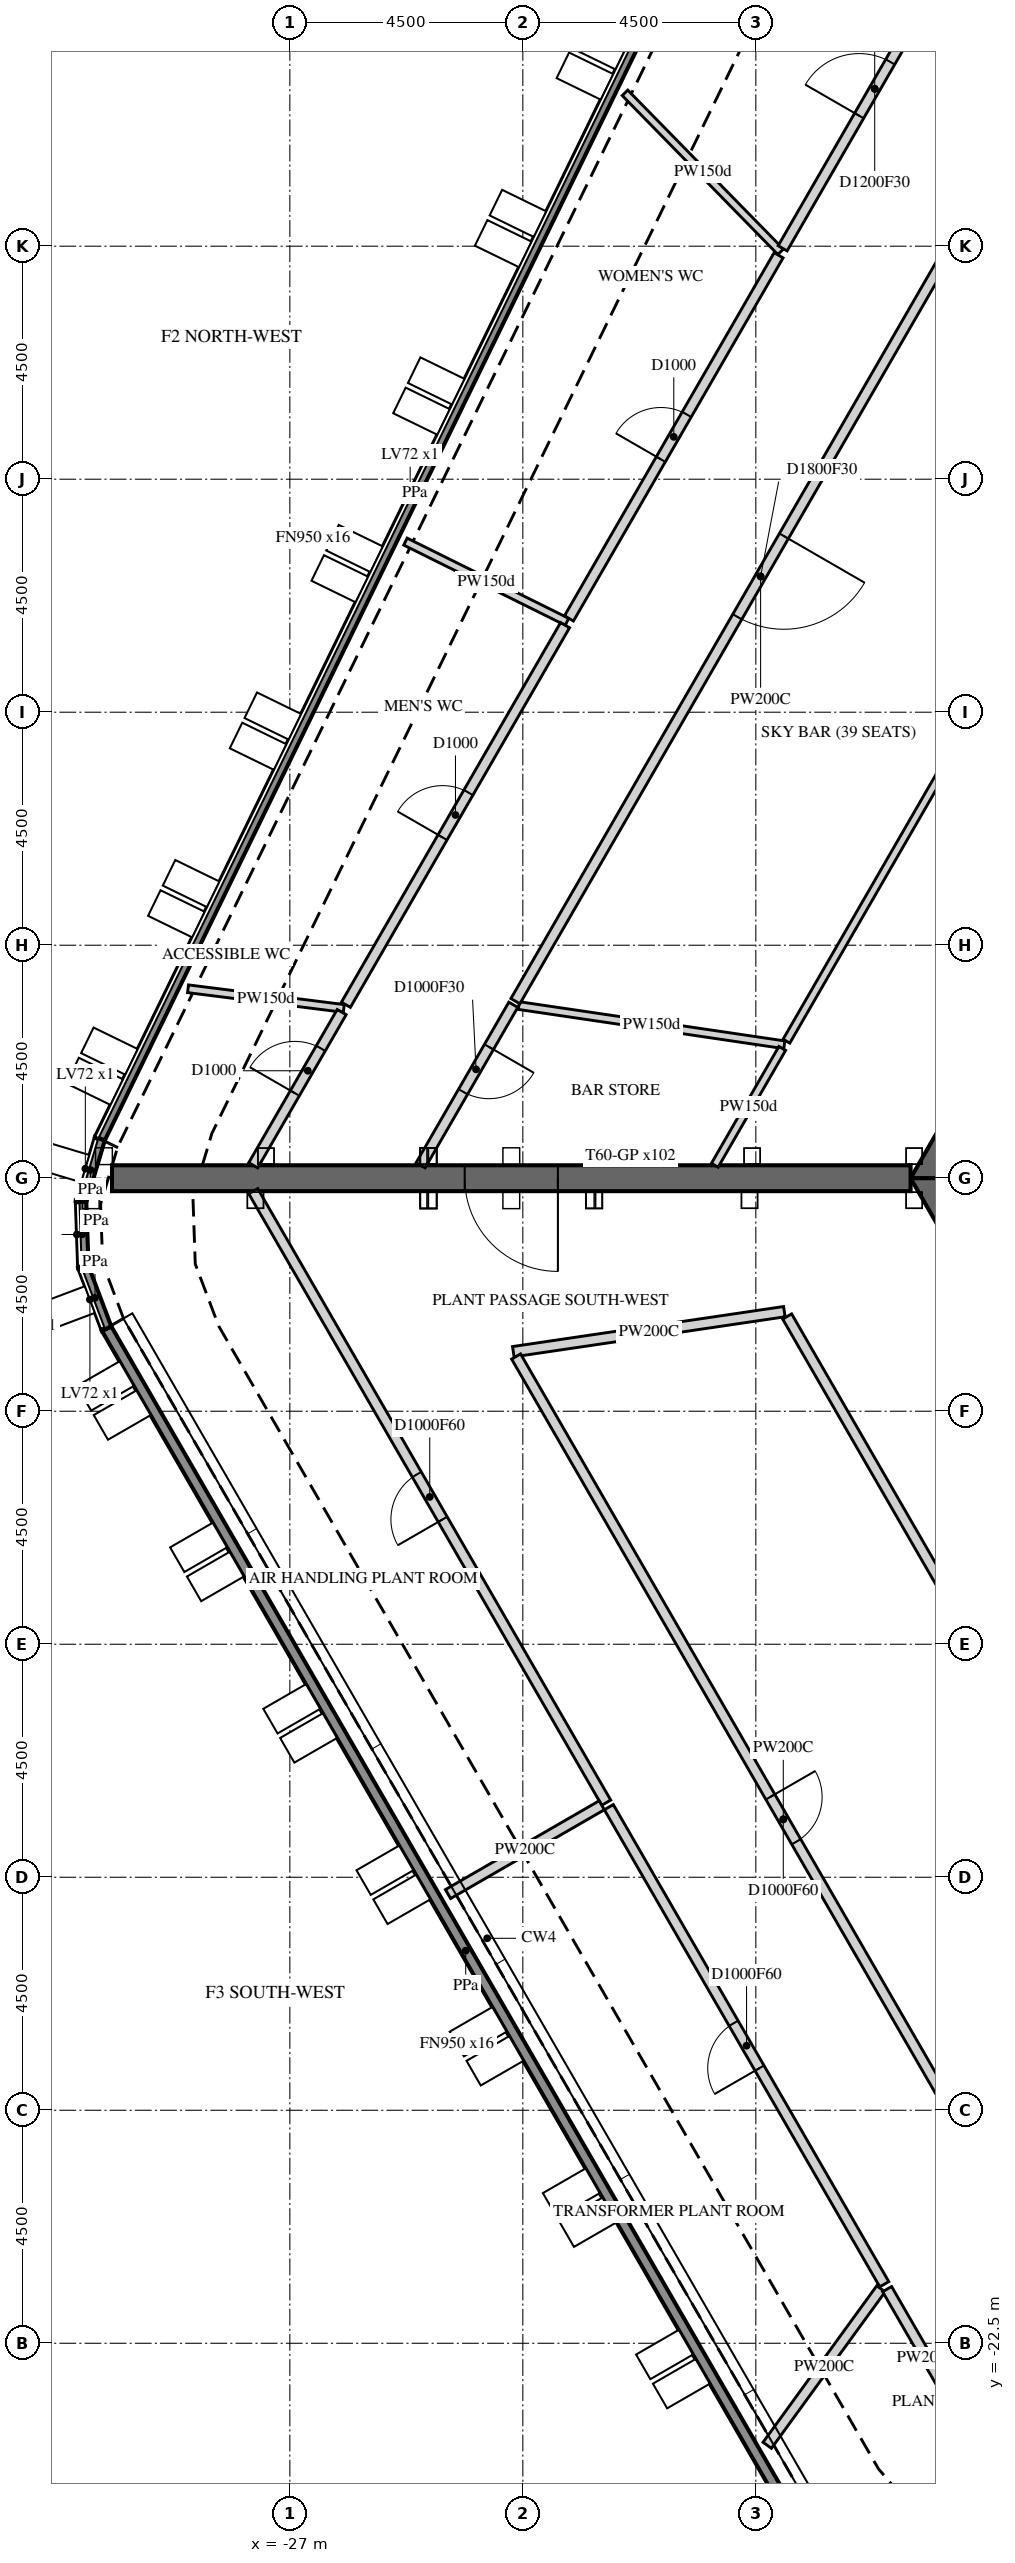
"""IFC4 building model, lengths in metres.
Left out: names, types, materials, properties, quantities, classifications, styles, units other than length and angle.
Written with IfcOpenShell. Run it as: python <this file> out.ifc"""

import sys

from ifc_helpers import new_model, si_unit, direction, frame, frame_2d, origin, place, context, subcontext, project, spatial, polyline, rectangle, outline, extrude, element, fill, save


model = new_model("IFC4")
c1 = context("Model", 3, precision=1e-05, world=origin(), true_north=direction((0.0, 1.0)))
c2 = subcontext(c1, "Body", "Model", "MODEL_VIEW")
j1 = project(units=[si_unit("LENGTHUNIT", "METRE"), si_unit("PLANEANGLEUNIT", "RADIAN")], contexts=[c1])
p1 = place(None, origin())
s1 = spatial("IfcSite", under=j1, at=p1, CompositionType="ELEMENT")
p2 = place(p1, origin())
s2 = spatial("IfcBuilding", under=s1, at=p2, CompositionType="ELEMENT")
p3 = place(p2, frame((0.0, 0.0, 250.2)))
s3 = spatial("IfcBuildingStorey", under=s2, at=p3, CompositionType="ELEMENT", Elevation=250.2)
p4 = place(p3, frame((-16.668, -26.93, 5.7), z_axis=(0.0, 0.0, 1.0), x_axis=(-0.499997219864, 0.866027008891, 0.0)))
e1 = element("IfcWall", 1, at=p4, inside=s3, PredefinedType="PARAPET", context=c2, shape_type="SweptSolid", body=[
    extrude(outline(polyline([(0.009, -0.1), (27.732, -0.1), (27.749, 0.1), (-0.009, 0.1), (0.009, -0.1)])), origin(), (0.0, 0.0, 1.0), 1.1),
])
p5 = place(p3, frame((-30.539, -2.906, 5.7), z_axis=(0.0, 0.0, 1.0), x_axis=(-0.352930531417, 0.935649528399, 0.0)))
e2 = element("IfcWall", 2, at=p5, inside=s3, PredefinedType="PARAPET", context=c2, shape_type="SweptSolid", body=[
    extrude(outline(polyline([(0.008, -0.1), (1.256, -0.1), (1.289, 0.1), (-0.008, 0.1), (0.008, -0.1)])), origin(), (0.0, 0.0, 1.0), 1.1),
])
p6 = place(p3, frame((-30.988, -1.715, 5.7), z_axis=(0.0, 0.0, 1.0), x_axis=(-0.034940984606, 0.999389377367, 0.0)))
e3 = element("IfcWall", 3, at=p6, inside=s3, PredefinedType="PARAPET", context=c2, shape_type="SweptSolid", body=[
    extrude(outline(polyline([(0.016, -0.1), (1.248, -0.1), (1.281, 0.1), (-0.016, 0.1), (0.016, -0.1)])), origin(), (0.0, 0.0, 1.0), 1.1),
])
p7 = place(p3, frame((-31.032, -0.451, 5.7), z_axis=(0.0, 0.0, 1.0), x_axis=(0.286960705178, 0.95794235405, 0.0)))
e4 = element("IfcWall", 4, at=p7, inside=s3, PredefinedType="PARAPET", context=c2, shape_type="SweptSolid", body=[
    extrude(outline(polyline([(0.016, -0.1), (1.265, -0.1), (1.281, 0.1), (-0.016, 0.1), (0.016, -0.1)])), origin(), (0.0, 0.0, 1.0), 1.1),
])
p8 = place(p3, frame((-30.667, 0.768, 5.7), z_axis=(0.0, 0.0, 1.0), x_axis=(0.43836623679, 0.898796441049, 0.0)))
e5 = element("IfcWall", 5, at=p8, inside=s3, PredefinedType="PARAPET", context=c2, shape_type="SweptSolid", body=[
    extrude(outline(polyline([(0.008, -0.1), (27.731, -0.1), (27.75, 0.1), (-0.008, 0.1), (0.008, -0.1)])), origin(), (0.0, 0.0, 1.0), 1.1),
])
p9 = place(p3, frame((-7.361, 12.75, -0.3), z_axis=(0.0, 0.0, 1.0), x_axis=(-0.50000571537, -0.866022103989, 0.0)))
e6 = element("IfcWall", 6, at=p9, inside=s3, PredefinedType="SHEAR", context=c2, shape_type="SweptSolid", body=[
    extrude(outline(polyline([(-0.144, -0.25), (14.867, -0.25), (14.578, 0.25), (0.144, 0.25), (-0.144, -0.25)])), origin(), (0.0, 0.0, 1.0), 5.8),
])
p10 = place(p9, frame((6.49, 0.0, 0.3)))
e7 = element("IfcOpeningElement", 7, at=p10, cuts=e6, PredefinedType="OPENING", context=c2, shape_type="SweptSolid", body=[
    extrude(rectangle(XDim=1.8, YDim=2.4, at=frame_2d((0.9, 1.2))), frame((0.0, 0.26, 0.0), z_axis=(0.0, -1.0, 0.0), x_axis=(1.0, 0.0, 0.0)), (0.0, 0.0, 1.0), 0.52),
])
p11 = place(p3, frame((-14.722, 0.0, -0.3), z_axis=(0.0, 0.0, 1.0), x_axis=(0.50000571537, -0.866022103989, 0.0)))
e8 = element("IfcWall", 8, at=p11, inside=s3, PredefinedType="SHEAR", context=c2, shape_type="SweptSolid", body=[
    extrude(outline(polyline([(-0.144, -0.25), (14.867, -0.25), (14.578, 0.25), (0.144, 0.25), (-0.144, -0.25)])), origin(), (0.0, 0.0, 1.0), 5.8),
])
p12 = place(p11, frame((6.432, 0.0, 0.3)))
e9 = element("IfcOpeningElement", 9, at=p12, cuts=e8, PredefinedType="OPENING", context=c2, shape_type="SweptSolid", body=[
    extrude(rectangle(XDim=1.8, YDim=2.4, at=frame_2d((0.9, 1.2))), frame((0.0, 0.26, 0.0), z_axis=(0.0, -1.0, 0.0), x_axis=(1.0, 0.0, 0.0)), (0.0, 0.0, 1.0), 0.52),
])
p13 = place(p3, frame((-15.011, 0.0, -0.3), z_axis=(0.0, 0.0, 1.0), x_axis=(-1.0, 0.0, 0.0)))
e10 = element("IfcWall", 10, at=p13, inside=s3, PredefinedType="SHEAR", context=c2, shape_type="SweptSolid", body=[
    extrude(rectangle(XDim=15.424, YDim=0.5, at=frame_2d((7.712, 0.0))), origin(), (0.0, 0.0, 1.0), 5.8),
])
p14 = place(p13, frame((6.812, 0.0, 0.3)))
e11 = element("IfcOpeningElement", 11, at=p14, cuts=e10, PredefinedType="OPENING", context=c2, shape_type="SweptSolid", body=[
    extrude(rectangle(XDim=1.8, YDim=2.4, at=frame_2d((0.9, 1.2))), frame((0.0, 0.26, 0.0), z_axis=(0.0, -1.0, 0.0), x_axis=(1.0, 0.0, 0.0)), (0.0, 0.0, 1.0), 0.52),
])
p15 = place(p3, frame((-28.966, 3.659, 0.0), z_axis=(0.0, 0.0, 1.0), x_axis=(0.992111002578, -0.125362508604, 0.0)))
e12 = element("IfcWall", 12, at=p15, inside=s3, PredefinedType="PARTITIONING", context=c2, shape_type="SweptSolid", body=[
    extrude(rectangle(XDim=3.032, YDim=0.15, at=frame_2d((1.516, 0.0))), origin(), (0.0, 0.0, 1.0), 5.5),
])
p16 = place(p3, frame((-20.889, -12.06, 0.0), z_axis=(0.0, 0.0, 1.0), x_axis=(-0.49997661062, 0.866038907228, 0.0)))
e13 = element("IfcWall", 13, at=p16, inside=s3, PredefinedType="PARTITIONING", context=c2, shape_type="SweptSolid", body=[
    extrude(rectangle(XDim=13.637, YDim=0.2, at=frame_2d((6.818, 0.0))), origin(), (0.0, 0.0, 1.0), 5.5),
])
p17 = place(p16, frame((6.318, 0.0, 0.0)))
e14 = element("IfcOpeningElement", 14, at=p17, cuts=e13, PredefinedType="OPENING", context=c2, shape_type="SweptSolid", body=[
    extrude(rectangle(XDim=1.0, YDim=2.1, at=frame_2d((0.5, 1.05))), frame((0.0, 0.11, 0.0), z_axis=(0.0, -1.0, 0.0), x_axis=(1.0, 0.0, 0.0)), (0.0, 0.0, 1.0), 0.22),
])
p18 = place(p3, frame((-27.707, 0.25, 0.0), z_axis=(0.0, 0.0, 1.0), x_axis=(0.50003588027, 0.86600468731, 0.0)))
e15 = element("IfcWall", 15, at=p18, inside=s3, PredefinedType="PARTITIONING", context=c2, shape_type="SweptSolid", body=[
    extrude(rectangle(XDim=3.416, YDim=0.2, at=frame_2d((1.708, 0.0))), origin(), (0.0, 0.0, 1.0), 5.5),
])
p19 = place(p18, frame((1.608, 0.0, 0.0)))
e16 = element("IfcOpeningElement", 16, at=p19, cuts=e15, PredefinedType="OPENING", context=c2, shape_type="SweptSolid", body=[
    extrude(rectangle(XDim=1.0, YDim=2.1, at=frame_2d((0.5, 1.05))), frame((0.0, 0.11, 0.0), z_axis=(0.0, -1.0, 0.0), x_axis=(1.0, 0.0, 0.0)), (0.0, 0.0, 1.0), 0.22),
])
p20 = place(p3, frame((-24.767, 12.295, 0.0), z_axis=(0.0, 0.0, 1.0), x_axis=(0.895713074793, -0.444632531024, 0.0)))
e17 = element("IfcWall", 17, at=p20, inside=s3, PredefinedType="PARTITIONING", context=c2, shape_type="SweptSolid", body=[
    extrude(rectangle(XDim=3.483, YDim=0.15, at=frame_2d((1.742, 0.0))), origin(), (0.0, 0.0, 1.0), 5.5),
])
p21 = place(p3, frame((-22.684, 3.35, 0.0), z_axis=(0.0, 0.0, 1.0), x_axis=(-0.500041240653, -0.866001592173, 0.0)))
e18 = element("IfcWall", 18, at=p21, inside=s3, PredefinedType="PARTITIONING", context=c2, shape_type="SweptSolid", body=[
    extrude(rectangle(XDim=3.58, YDim=0.2, at=frame_2d((1.79, 0.0))), origin(), (0.0, 0.0, 1.0), 5.5),
])
p22 = place(p21, frame((0.94, 0.0, 0.0)))
e19 = element("IfcOpeningElement", 19, at=p22, cuts=e18, PredefinedType="OPENING", context=c2, shape_type="SweptSolid", body=[
    extrude(rectangle(XDim=1.0, YDim=2.1, at=frame_2d((0.5, 1.05))), frame((0.0, 0.11, 0.0), z_axis=(0.0, -1.0, 0.0), x_axis=(1.0, 0.0, 0.0)), (0.0, 0.0, 1.0), 0.22),
])
p23 = place(p3, frame((-23.945, -13.825, 0.0), z_axis=(0.0, 0.0, 1.0), x_axis=(0.865991142412, 0.500059337743, 0.0)))
e20 = element("IfcWall", 20, at=p23, inside=s3, PredefinedType="PARTITIONING", context=c2, shape_type="SweptSolid", body=[
    extrude(rectangle(XDim=3.429, YDim=0.2, at=frame_2d((1.715, 0.0))), origin(), (0.0, 0.0, 1.0), 5.5),
])
p24 = place(p3, frame((-22.684, -3.35, 0.0), z_axis=(0.0, 0.0, 1.0), x_axis=(0.989268510668, 0.146108910753, 0.0)))
e21 = element("IfcWall", 21, at=p24, inside=s3, PredefinedType="PARTITIONING", context=c2, shape_type="SweptSolid", body=[
    extrude(rectangle(XDim=5.292, YDim=0.2, at=frame_2d((2.646, 0.0))), origin(), (0.0, 0.0, 1.0), 5.5),
])
p25 = place(p3, frame((-22.578, 3.334, 0.0), z_axis=(0.0, 0.0, 1.0), x_axis=(0.989272631556, -0.146081006478, 0.0)))
e22 = element("IfcWall", 22, at=p25, inside=s3, PredefinedType="PARTITIONING", context=c2, shape_type="SweptSolid", body=[
    extrude(rectangle(XDim=5.184, YDim=0.15, at=frame_2d((2.592, 0.0))), origin(), (0.0, 0.0, 1.0), 5.5),
])
p26 = place(p3, frame((-13.172, 19.825, 0.0), z_axis=(0.0, 0.0, 1.0), x_axis=(-0.499999503755, -0.866025690291, 0.0)))
e23 = element("IfcWall", 23, at=p26, inside=s3, PredefinedType="PARTITIONING", context=c2, shape_type="SweptSolid", body=[
    extrude(rectangle(XDim=18.943, YDim=0.2, at=frame_2d((9.471, 0.0))), origin(), (0.0, 0.0, 1.0), 5.5),
])
p27 = place(p26, frame((8.572, 0.0, 0.0)))
e24 = element("IfcOpeningElement", 24, at=p27, cuts=e23, PredefinedType="OPENING", context=c2, shape_type="SweptSolid", body=[
    extrude(rectangle(XDim=1.8, YDim=2.1, at=frame_2d((0.9, 1.05))), frame((0.0, 0.11, 0.0), z_axis=(0.0, -1.0, 0.0), x_axis=(1.0, 0.0, 0.0)), (0.0, 0.0, 1.0), 0.22),
])
p28 = place(p3, frame((-25.917, 3.349, 0.0), z_axis=(0.0, 0.0, 1.0), x_axis=(0.499982078236, 0.866035750673, 0.0)))
e25 = element("IfcWall", 25, at=p28, inside=s3, PredefinedType="PARTITIONING", context=c2, shape_type="SweptSolid", body=[
    extrude(rectangle(XDim=8.466, YDim=0.2, at=frame_2d((4.233, 0.0))), origin(), (0.0, 0.0, 1.0), 5.5),
])
p29 = place(p28, frame((3.733, 0.0, 0.0)))
e26 = element("IfcOpeningElement", 26, at=p29, cuts=e25, PredefinedType="OPENING", context=c2, shape_type="SweptSolid", body=[
    extrude(rectangle(XDim=1.0, YDim=2.1, at=frame_2d((0.5, 1.05))), frame((0.0, 0.11, 0.0), z_axis=(0.0, -1.0, 0.0), x_axis=(1.0, 0.0, 0.0)), (0.0, 0.0, 1.0), 0.22),
])
p30 = place(p3, frame((-15.519, -21.36, 0.0), z_axis=(0.0, 0.0, 1.0), x_axis=(-0.500040928938, 0.866001772162, 0.0)))
e27 = element("IfcWall", 27, at=p30, inside=s3, PredefinedType="PARTITIONING", context=c2, shape_type="SweptSolid", body=[
    extrude(rectangle(XDim=10.639, YDim=0.2, at=frame_2d((5.32, 0.0))), origin(), (0.0, 0.0, 1.0), 5.5),
])
p31 = place(p30, frame((4.82, 0.0, 0.0)))
e28 = element("IfcOpeningElement", 28, at=p31, cuts=e27, PredefinedType="OPENING", context=c2, shape_type="SweptSolid", body=[
    extrude(rectangle(XDim=1.0, YDim=2.1, at=frame_2d((0.5, 1.05))), frame((0.0, 0.11, 0.0), z_axis=(0.0, -1.0, 0.0), x_axis=(1.0, 0.0, 0.0)), (0.0, 0.0, 1.0), 0.22),
])
p32 = place(p3, frame((-20.527, 20.962, 0.0), z_axis=(0.0, 0.0, 1.0), x_axis=(0.699623583843, -0.714511610074, 0.0)))
e29 = element("IfcWall", 29, at=p32, inside=s3, PredefinedType="PARTITIONING", context=c2, shape_type="SweptSolid", body=[
    extrude(rectangle(XDim=4.296, YDim=0.15, at=frame_2d((2.148, 0.0))), origin(), (0.0, 0.0, 1.0), 5.5),
])
p33 = place(p3, frame((-17.78, -24.471, 0.0), z_axis=(0.0, 0.0, 1.0), x_axis=(0.587876353265, 0.808950797807, 0.0)))
e30 = element("IfcWall", 30, at=p33, inside=s3, PredefinedType="PARTITIONING", context=c2, shape_type="SweptSolid", body=[
    extrude(rectangle(XDim=3.736, YDim=0.2, at=frame_2d((1.868, 0.0))), origin(), (0.0, 0.0, 1.0), 5.5),
])
p34 = place(p3, frame((-21.609, 10.811, 0.0), z_axis=(0.0, 0.0, 1.0), x_axis=(0.500032982845, 0.866006360293, 0.0)))
e31 = element("IfcWall", 31, at=p34, inside=s3, PredefinedType="PARTITIONING", context=c2, shape_type="SweptSolid", body=[
    extrude(rectangle(XDim=8.099, YDim=0.2, at=frame_2d((4.049, 0.0))), origin(), (0.0, 0.0, 1.0), 5.5),
])
p35 = place(p34, frame((3.549, 0.0, 0.0)))
e32 = element("IfcOpeningElement", 32, at=p35, cuts=e31, PredefinedType="OPENING", context=c2, shape_type="SweptSolid", body=[
    extrude(rectangle(XDim=1.0, YDim=2.1, at=frame_2d((0.5, 1.05))), frame((0.0, 0.11, 0.0), z_axis=(0.0, -1.0, 0.0), x_axis=(1.0, 0.0, 0.0)), (0.0, 0.0, 1.0), 0.22),
])
p36 = place(p3, frame((-17.395, -2.67, 0.0), z_axis=(0.0, 0.0, 1.0), x_axis=(0.499971736126, -0.866041721325, 0.0)))
e33 = element("IfcWall", 33, at=p36, inside=s3, PredefinedType="PARTITIONING", context=c2, shape_type="SweptSolid", body=[
    extrude(rectangle(XDim=15.854, YDim=0.2, at=frame_2d((7.927, 0.0))), origin(), (0.0, 0.0, 1.0), 5.5),
])
p37 = place(p3, frame((-17.489, 2.507, 0.0), z_axis=(0.0, 0.0, 1.0), x_axis=(-0.500168359116, -0.865928179781, 0.0)))
e34 = element("IfcWall", 34, at=p37, inside=s3, PredefinedType="PARTITIONING", context=c2, shape_type="SweptSolid", body=[
    extrude(rectangle(XDim=2.606, YDim=0.15, at=frame_2d((1.303, 0.0))), origin(), (0.0, 0.0, 1.0), 5.5),
])
p38 = place(p3, frame((-15.464, -21.455, 0.0), z_axis=(0.0, 0.0, 1.0), x_axis=(0.49988498741, -0.866091796152, 0.0)))
e35 = element("IfcWall", 35, at=p38, inside=s3, PredefinedType="PARTITIONING", context=c2, shape_type="SweptSolid", body=[
    extrude(rectangle(XDim=3.077, YDim=0.2, at=frame_2d((1.539, 0.0))), origin(), (0.0, 0.0, 1.0), 5.5),
])
p39 = place(p3, frame((-17.482, 17.959, 0.0), z_axis=(0.0, 0.0, 1.0), x_axis=(0.499926463787, 0.866067855774, 0.0)))
e36 = element("IfcWall", 36, at=p39, inside=s3, PredefinedType="PARTITIONING", context=c2, shape_type="SweptSolid", body=[
    extrude(rectangle(XDim=7.113, YDim=0.2, at=frame_2d((3.557, 0.0))), origin(), (0.0, 0.0, 1.0), 4.573),
])
p40 = place(p39, frame((2.957, 0.0, 0.0)))
e37 = element("IfcOpeningElement", 37, at=p40, cuts=e36, PredefinedType="OPENING", context=c2, shape_type="SweptSolid", body=[
    extrude(rectangle(XDim=1.2, YDim=2.1, at=frame_2d((0.6, 1.05))), frame((0.0, 0.11, 0.0), z_axis=(0.0, -1.0, 0.0), x_axis=(1.0, 0.0, 0.0)), (0.0, 0.0, 1.0), 0.22),
])
p41 = place(p3, frame((-22.63, -3.443, 0.0), z_axis=(0.0, 0.0, 1.0), x_axis=(0.49999205116, -0.866029993001, 0.0)))
e38 = element("IfcWall", 38, at=p41, inside=s3, PredefinedType="PARTITIONING", context=c2, shape_type="SweptSolid", body=[
    extrude(rectangle(XDim=20.642, YDim=0.2, at=frame_2d((10.321, 0.0))), origin(), (0.0, 0.0, 1.0), 5.5),
])
p42 = place(p41, frame((9.821, 0.0, 0.0)))
e39 = element("IfcOpeningElement", 39, at=p42, cuts=e38, PredefinedType="OPENING", context=c2, shape_type="SweptSolid", body=[
    extrude(rectangle(XDim=1.0, YDim=2.1, at=frame_2d((0.5, 1.05))), frame((0.0, 0.11, 0.0), z_axis=(0.0, -1.0, 0.0), x_axis=(1.0, 0.0, 0.0)), (0.0, 0.0, 1.0), 0.22),
])
p43 = place(p3, frame((-10.174, 15.177, 0.0), z_axis=(0.0, 0.0, 1.0), x_axis=(-0.500018949701, -0.866014462893, 0.0)))
e40 = element("IfcWall", 40, at=p43, inside=s3, PredefinedType="PARTITIONING", context=c2, shape_type="SweptSolid", body=[
    extrude(rectangle(XDim=14.469, YDim=0.15, at=frame_2d((7.235, 0.0))), origin(), (0.0, 0.0, 1.0), 5.5),
])
p44 = place(p14, origin())
e41 = element("IfcDoor", 41, at=p44, inside=s3, OperationType="DOUBLE_DOOR_SINGLE_SWING", PredefinedType="DOOR", context=c2, shape_type="SweptSolid", body=[
    extrude(rectangle(XDim=1.8, YDim=2.4, at=frame_2d((0.9, 1.2))), frame((0.0, 0.025, 0.0), z_axis=(0.0, -1.0, 0.0), x_axis=(1.0, 0.0, 0.0)), (0.0, 0.0, 1.0), 0.05),
])
fill(e11, e41)
p45 = place(p17, origin())
e42 = element("IfcDoor", 42, at=p45, inside=s3, OperationType="SINGLE_SWING_RIGHT", PredefinedType="DOOR", context=c2, shape_type="SweptSolid", body=[
    extrude(rectangle(XDim=1.0, YDim=2.1, at=frame_2d((0.5, 1.05))), frame((0.0, 0.025, 0.0), z_axis=(0.0, -1.0, 0.0), x_axis=(1.0, 0.0, 0.0)), (0.0, 0.0, 1.0), 0.05),
])
fill(e14, e42)
p46 = place(p19, origin())
e43 = element("IfcDoor", 43, at=p46, inside=s3, OperationType="SINGLE_SWING_LEFT", PredefinedType="DOOR", context=c2, shape_type="SweptSolid", body=[
    extrude(rectangle(XDim=1.0, YDim=2.1, at=frame_2d((0.5, 1.05))), frame((0.0, 0.025, 0.0), z_axis=(0.0, -1.0, 0.0), x_axis=(1.0, 0.0, 0.0)), (0.0, 0.0, 1.0), 0.05),
])
fill(e16, e43)
p47 = place(p22, origin())
e44 = element("IfcDoor", 44, at=p47, inside=s3, OperationType="SINGLE_SWING_RIGHT", PredefinedType="DOOR", context=c2, shape_type="SweptSolid", body=[
    extrude(rectangle(XDim=1.0, YDim=2.1, at=frame_2d((0.5, 1.05))), frame((0.0, 0.025, 0.0), z_axis=(0.0, -1.0, 0.0), x_axis=(1.0, 0.0, 0.0)), (0.0, 0.0, 1.0), 0.05),
])
fill(e19, e44)
p48 = place(p27, origin())
e45 = element("IfcDoor", 45, at=p48, inside=s3, OperationType="DOUBLE_DOOR_SINGLE_SWING", PredefinedType="DOOR", context=c2, shape_type="SweptSolid", body=[
    extrude(rectangle(XDim=1.8, YDim=2.1, at=frame_2d((0.9, 1.05))), frame((0.0, 0.025, 0.0), z_axis=(0.0, -1.0, 0.0), x_axis=(1.0, 0.0, 0.0)), (0.0, 0.0, 1.0), 0.05),
])
fill(e24, e45)
p49 = place(p29, origin())
e46 = element("IfcDoor", 46, at=p49, inside=s3, OperationType="SINGLE_SWING_RIGHT", PredefinedType="DOOR", context=c2, shape_type="SweptSolid", body=[
    extrude(rectangle(XDim=1.0, YDim=2.1, at=frame_2d((0.5, 1.05))), frame((0.0, 0.025, 0.0), z_axis=(0.0, -1.0, 0.0), x_axis=(1.0, 0.0, 0.0)), (0.0, 0.0, 1.0), 0.05),
])
fill(e26, e46)
p50 = place(p31, origin())
e47 = element("IfcDoor", 47, at=p50, inside=s3, OperationType="SINGLE_SWING_LEFT", PredefinedType="DOOR", context=c2, shape_type="SweptSolid", body=[
    extrude(rectangle(XDim=1.0, YDim=2.1, at=frame_2d((0.5, 1.05))), frame((0.0, 0.025, 0.0), z_axis=(0.0, -1.0, 0.0), x_axis=(1.0, 0.0, 0.0)), (0.0, 0.0, 1.0), 0.05),
])
fill(e28, e47)
p51 = place(p35, origin())
e48 = element("IfcDoor", 48, at=p51, inside=s3, OperationType="SINGLE_SWING_RIGHT", PredefinedType="DOOR", context=c2, shape_type="SweptSolid", body=[
    extrude(rectangle(XDim=1.0, YDim=2.1, at=frame_2d((0.5, 1.05))), frame((0.0, 0.025, 0.0), z_axis=(0.0, -1.0, 0.0), x_axis=(1.0, 0.0, 0.0)), (0.0, 0.0, 1.0), 0.05),
])
fill(e32, e48)
p52 = place(p40, origin())
e49 = element("IfcDoor", 49, at=p52, inside=s3, OperationType="SINGLE_SWING_RIGHT", PredefinedType="DOOR", context=c2, shape_type="SweptSolid", body=[
    extrude(rectangle(XDim=1.2, YDim=2.1, at=frame_2d((0.6, 1.05))), frame((0.0, 0.025, 0.0), z_axis=(0.0, -1.0, 0.0), x_axis=(1.0, 0.0, 0.0)), (0.0, 0.0, 1.0), 0.05),
])
fill(e37, e49)
p53 = place(p42, origin())
e50 = element("IfcDoor", 50, at=p53, inside=s3, OperationType="SINGLE_SWING_LEFT", PredefinedType="DOOR", context=c2, shape_type="SweptSolid", body=[
    extrude(rectangle(XDim=1.0, YDim=2.1, at=frame_2d((0.5, 1.05))), frame((0.0, 0.025, 0.0), z_axis=(0.0, -1.0, 0.0), x_axis=(1.0, 0.0, 0.0)), (0.0, 0.0, 1.0), 0.05),
])
fill(e39, e50)
save(model, sys.argv[1])
